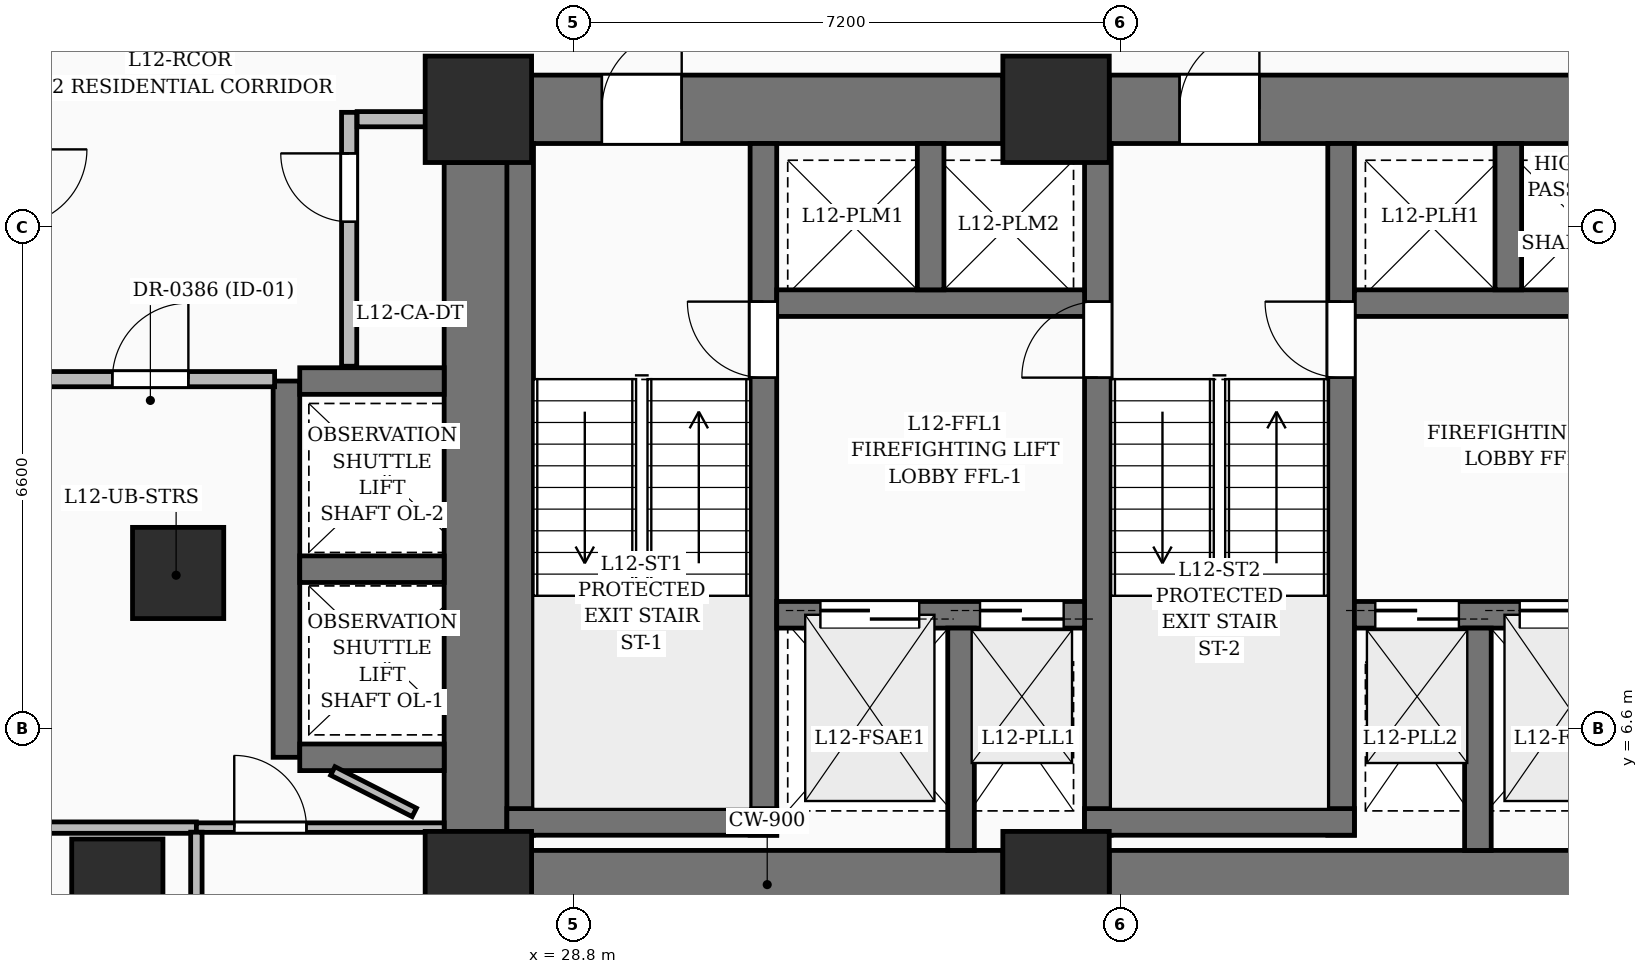
"""IFC4 building model, lengths in metres.
Left out: names, types, materials, properties, quantities, classifications, styles, units other than length and angle.
Written with IfcOpenShell. Run it as: python <this file> out.ifc"""

import sys

from ifc_helpers import new_model, si_unit, direction, frame, frame_2d, origin, origin_2d, place, context, subcontext, project, spatial, rectangle, extrude, element, fill, save


model = new_model("IFC4")
c1 = context("Model", 3, precision=1e-05, world=origin(), true_north=direction((0.0, 1.0)))
c2 = subcontext(c1, "Body", "Model", "MODEL_VIEW")
j1 = project(units=[si_unit("LENGTHUNIT", "METRE"), si_unit("PLANEANGLEUNIT", "RADIAN")], contexts=[c1])
p1 = place(None, origin())
s1 = spatial("IfcSite", under=j1, at=p1, CompositionType="ELEMENT")
p2 = place(p1, origin())
s2 = spatial("IfcBuilding", under=s1, at=p2, CompositionType="ELEMENT")
p3 = place(p2, frame((0.0, 0.0, 53.4)))
s3 = spatial("IfcBuildingStorey", under=s2, at=p3, CompositionType="ELEMENT", Elevation=53.4)
for number, where, z_axis, x_axis in (
    (1, (27.55, 4.55, 0.0), (0.0, 0.0, 1.0), (1.0, 0.0, 0.0)),
    (2, (35.15, 4.55, 0.0), (0.0, 0.0, 1.0), (1.0, 0.0, 0.0)),
    (3, (27.55, 14.75, 0.0), (0.0, 0.0, 1.0), (1.0, 0.0, 0.0)),
    (4, (35.15, 14.75, 0.0), (0.0, 0.0, 1.0), (1.0, 0.0, 0.0)),
):
    element("IfcColumn", number, at=place(p3, frame(where, z_axis=z_axis, x_axis=x_axis)), inside=s3, PredefinedType="COLUMN", context=c2, shape_type="SweptSolid", body=[
        extrude(rectangle(XDim=1.4, YDim=1.4, at=origin_2d()), origin(), (0.0, 0.0, 1.0), 3.6),
    ])
for number, where, z_axis, x_axis in (
    (5, (22.8, 4.55, 0.0), (0.0, 0.0, 1.0), (1.0, 0.0, 0.0)),
    (6, (23.6, 8.65, 0.0), (0.0, 0.0, 1.0), (1.0, 0.0, 0.0)),
):
    element("IfcColumn", number, at=place(p3, frame(where, z_axis=z_axis, x_axis=x_axis)), inside=s3, PredefinedType="COLUMN", context=c2, shape_type="SweptSolid", body=[
        extrude(rectangle(XDim=1.2, YDim=1.2, at=origin_2d()), origin(), (0.0, 0.0, 1.0), 3.6),
    ])
p4 = place(p3, frame((28.25, 4.55, 0.0), z_axis=(0.0, 0.0, 1.0), x_axis=(1.0, 0.0, 0.0)))
e7 = element("IfcWall", 7, at=p4, inside=s3, PredefinedType="SHEAR", context=c2, shape_type="SweptSolid", body=[
    extrude(rectangle(XDim=6.2, YDim=0.9, at=frame_2d((3.1, 0.0))), origin(), (0.0, 0.0, 1.0), 3.6),
])
p5 = place(p3, frame((35.85, 4.55, 0.0), z_axis=(0.0, 0.0, 1.0), x_axis=(1.0, 0.0, 0.0)))
e8 = element("IfcWall", 8, at=p5, inside=s3, PredefinedType="SHEAR", context=c2, shape_type="SweptSolid", body=[
    extrude(rectangle(XDim=10.5, YDim=0.9, at=frame_2d((5.25, 0.0))), origin(), (0.0, 0.0, 1.0), 3.6),
])
p6 = place(p3, frame((28.25, 14.75, 0.0), z_axis=(0.0, 0.0, 1.0), x_axis=(1.0, 0.0, 0.0)))
e9 = element("IfcWall", 9, at=p6, inside=s3, PredefinedType="SHEAR", context=c2, shape_type="SweptSolid", body=[
    extrude(rectangle(XDim=6.2, YDim=0.9, at=frame_2d((3.1, 0.0))), origin(), (0.0, 0.0, 1.0), 3.6),
])
p7 = place(p6, frame((0.925, 0.0, 0.0)))
e10 = element("IfcOpeningElement", 10, at=p7, cuts=e9, PredefinedType="OPENING", context=c2, shape_type="SweptSolid", body=[
    extrude(rectangle(XDim=1.05, YDim=2.15, at=frame_2d((0.525, 1.075))), frame((0.0, 0.46, 0.0), z_axis=(0.0, -1.0, 0.0), x_axis=(1.0, 0.0, 0.0)), (0.0, 0.0, 1.0), 0.92),
])
p8 = place(p3, frame((35.85, 14.75, 0.0), z_axis=(0.0, 0.0, 1.0), x_axis=(1.0, 0.0, 0.0)))
e11 = element("IfcWall", 11, at=p8, inside=s3, PredefinedType="SHEAR", context=c2, shape_type="SweptSolid", body=[
    extrude(rectangle(XDim=10.5, YDim=0.9, at=frame_2d((5.25, 0.0))), origin(), (0.0, 0.0, 1.0), 3.6),
])
p9 = place(p8, frame((0.925, 0.0, 0.0)))
e12 = element("IfcOpeningElement", 12, at=p9, cuts=e11, PredefinedType="OPENING", context=c2, shape_type="SweptSolid", body=[
    extrude(rectangle(XDim=1.05, YDim=2.15, at=frame_2d((0.525, 1.075))), frame((0.0, 0.46, 0.0), z_axis=(0.0, -1.0, 0.0), x_axis=(1.0, 0.0, 0.0)), (0.0, 0.0, 1.0), 0.92),
])
p10 = place(p8, frame((8.525, 0.0, 0.0)))
e13 = element("IfcOpeningElement", 13, at=p10, cuts=e11, PredefinedType="OPENING", context=c2, shape_type="SweptSolid", body=[
    extrude(rectangle(XDim=1.05, YDim=2.15, at=frame_2d((0.525, 1.075))), frame((0.0, 0.46, 0.0), z_axis=(0.0, -1.0, 0.0), x_axis=(1.0, 0.0, 0.0)), (0.0, 0.0, 1.0), 0.92),
])
p11 = place(p3, frame((27.55, 5.25, 0.0), z_axis=(0.0, 0.0, 1.0), x_axis=(0.0, 1.0, 0.0)))
e14 = element("IfcWall", 14, at=p11, inside=s3, PredefinedType="SHEAR", context=c2, shape_type="SweptSolid", body=[
    extrude(rectangle(XDim=8.8, YDim=0.9, at=frame_2d((4.4, 0.0))), origin(), (0.0, 0.0, 1.0), 3.6),
])
p12 = place(p3, frame((28.1, 5.2, 0.0), z_axis=(0.0, 0.0, 1.0), x_axis=(0.0, 1.0, 0.0)))
e15 = element("IfcWall", 15, at=p12, inside=s3, PredefinedType="SOLIDWALL", context=c2, shape_type="SweptSolid", body=[
    extrude(rectangle(XDim=9.1, YDim=0.35, at=frame_2d((4.55, 0.0))), origin(), (0.0, 0.0, 1.0), 3.6),
])
p13 = place(p3, frame((31.3, 5.2, 0.0), z_axis=(0.0, 0.0, 1.0), x_axis=(0.0, 1.0, 0.0)))
e16 = element("IfcWall", 16, at=p13, inside=s3, PredefinedType="SOLIDWALL", context=c2, shape_type="SweptSolid", body=[
    extrude(rectangle(XDim=9.1, YDim=0.35, at=frame_2d((4.55, 0.0))), origin(), (0.0, 0.0, 1.0), 3.6),
])
p14 = place(p13, frame((6.02, 0.0, 0.0)))
e17 = element("IfcOpeningElement", 17, at=p14, cuts=e16, PredefinedType="OPENING", context=c2, shape_type="SweptSolid", body=[
    extrude(rectangle(XDim=1.0, YDim=2.15, at=frame_2d((0.5, 1.075))), frame((0.0, 0.185, 0.0), z_axis=(0.0, -1.0, 0.0), x_axis=(1.0, 0.0, 0.0)), (0.0, 0.0, 1.0), 0.37),
])
p15 = place(p3, frame((27.925, 5.375, 0.0), z_axis=(0.0, 0.0, 1.0), x_axis=(1.0, 0.0, 0.0)))
e18 = element("IfcWall", 18, at=p15, inside=s3, PredefinedType="SOLIDWALL", context=c2, shape_type="SweptSolid", body=[
    extrude(rectangle(XDim=3.55, YDim=0.35, at=frame_2d((1.775, 0.0))), origin(), (0.0, 0.0, 1.0), 3.6),
])
p16 = place(p3, frame((35.7, 5.2, 0.0), z_axis=(0.0, 0.0, 1.0), x_axis=(0.0, 1.0, 0.0)))
e19 = element("IfcWall", 19, at=p16, inside=s3, PredefinedType="SOLIDWALL", context=c2, shape_type="SweptSolid", body=[
    extrude(rectangle(XDim=9.1, YDim=0.35, at=frame_2d((4.55, 0.0))), origin(), (0.0, 0.0, 1.0), 3.6),
])
p17 = place(p16, frame((6.02, 0.0, 0.0)))
e20 = element("IfcOpeningElement", 20, at=p17, cuts=e19, PredefinedType="OPENING", context=c2, shape_type="SweptSolid", body=[
    extrude(rectangle(XDim=1.0, YDim=2.15, at=frame_2d((0.5, 1.075))), frame((0.0, 0.185, 0.0), z_axis=(0.0, -1.0, 0.0), x_axis=(1.0, 0.0, 0.0)), (0.0, 0.0, 1.0), 0.37),
])
p18 = place(p3, frame((38.9, 5.2, 0.0), z_axis=(0.0, 0.0, 1.0), x_axis=(0.0, 1.0, 0.0)))
e21 = element("IfcWall", 21, at=p18, inside=s3, PredefinedType="SOLIDWALL", context=c2, shape_type="SweptSolid", body=[
    extrude(rectangle(XDim=9.1, YDim=0.35, at=frame_2d((4.55, 0.0))), origin(), (0.0, 0.0, 1.0), 3.6),
])
p19 = place(p18, frame((6.02, 0.0, 0.0)))
e22 = element("IfcOpeningElement", 22, at=p19, cuts=e21, PredefinedType="OPENING", context=c2, shape_type="SweptSolid", body=[
    extrude(rectangle(XDim=1.0, YDim=2.15, at=frame_2d((0.5, 1.075))), frame((0.0, 0.185, 0.0), z_axis=(0.0, -1.0, 0.0), x_axis=(1.0, 0.0, 0.0)), (0.0, 0.0, 1.0), 0.37),
])
p20 = place(p3, frame((35.525, 5.375, 0.0), z_axis=(0.0, 0.0, 1.0), x_axis=(1.0, 0.0, 0.0)))
e23 = element("IfcWall", 23, at=p20, inside=s3, PredefinedType="SOLIDWALL", context=c2, shape_type="SweptSolid", body=[
    extrude(rectangle(XDim=3.55, YDim=0.35, at=frame_2d((1.775, 0.0))), origin(), (0.0, 0.0, 1.0), 3.6),
])
p21 = place(p3, frame((31.475, 8.1, 0.0), z_axis=(0.0, 0.0, 1.0), x_axis=(1.0, 0.0, 0.0)))
e24 = element("IfcWall", 24, at=p21, inside=s3, PredefinedType="SOLIDWALL", context=c2, shape_type="SweptSolid", body=[
    extrude(rectangle(XDim=4.05, YDim=0.35, at=frame_2d((2.025, 0.0))), origin(), (0.0, 0.0, 1.0), 3.6),
])
p22 = place(p21, frame((0.575, 0.0, 0.0)))
e25 = element("IfcOpeningElement", 25, at=p22, cuts=e24, PredefinedType="OPENING", context=c2, shape_type="SweptSolid", body=[
    extrude(rectangle(XDim=1.3, YDim=2.25, at=frame_2d((0.65, 1.125))), frame((0.0, 0.185, 0.0), z_axis=(0.0, -1.0, 0.0), x_axis=(1.0, 0.0, 0.0)), (0.0, 0.0, 1.0), 0.37),
])
p23 = place(p21, frame((2.675, 0.0, 0.0)))
e26 = element("IfcOpeningElement", 26, at=p23, cuts=e24, PredefinedType="OPENING", context=c2, shape_type="SweptSolid", body=[
    extrude(rectangle(XDim=1.1, YDim=2.2, at=frame_2d((0.55, 1.1))), frame((0.0, 0.185, 0.0), z_axis=(0.0, -1.0, 0.0), x_axis=(1.0, 0.0, 0.0)), (0.0, 0.0, 1.0), 0.37),
])
p24 = place(p3, frame((39.075, 8.1, 0.0), z_axis=(0.0, 0.0, 1.0), x_axis=(1.0, 0.0, 0.0)))
e27 = element("IfcWall", 27, at=p24, inside=s3, PredefinedType="SOLIDWALL", context=c2, shape_type="SweptSolid", body=[
    extrude(rectangle(XDim=4.05, YDim=0.35, at=frame_2d((2.025, 0.0))), origin(), (0.0, 0.0, 1.0), 3.6),
])
p25 = place(p24, frame((2.175, 0.0, 0.0)))
e28 = element("IfcOpeningElement", 28, at=p25, cuts=e27, PredefinedType="OPENING", context=c2, shape_type="SweptSolid", body=[
    extrude(rectangle(XDim=1.3, YDim=2.25, at=frame_2d((0.65, 1.125))), frame((0.0, 0.185, 0.0), z_axis=(0.0, -1.0, 0.0), x_axis=(1.0, 0.0, 0.0)), (0.0, 0.0, 1.0), 0.37),
])
p26 = place(p24, frame((0.275, 0.0, 0.0)))
e29 = element("IfcOpeningElement", 29, at=p26, cuts=e27, PredefinedType="OPENING", context=c2, shape_type="SweptSolid", body=[
    extrude(rectangle(XDim=1.1, YDim=2.2, at=frame_2d((0.55, 1.1))), frame((0.0, 0.185, 0.0), z_axis=(0.0, -1.0, 0.0), x_axis=(1.0, 0.0, 0.0)), (0.0, 0.0, 1.0), 0.37),
])
for number, where, z_axis, x_axis in (
    (30, (33.9, 5.0, 0.0), (0.0, 0.0, 1.0), (0.0, 1.0, 0.0)),
    (31, (40.7, 5.0, 0.0), (0.0, 0.0, 1.0), (0.0, 1.0, 0.0)),
):
    element("IfcWall", number, at=place(p3, frame(where, z_axis=z_axis, x_axis=x_axis)), inside=s3, PredefinedType="SOLIDWALL", context=c2, shape_type="SweptSolid", body=[
        extrude(rectangle(XDim=2.925, YDim=0.35, at=frame_2d((1.462, 0.0))), origin(), (0.0, 0.0, 1.0), 3.6),
    ])
p27 = place(p3, frame((31.475, 12.2, 0.0), z_axis=(0.0, 0.0, 1.0), x_axis=(1.0, 0.0, 0.0)))
e32 = element("IfcWall", 32, at=p27, inside=s3, PredefinedType="SOLIDWALL", context=c2, shape_type="SweptSolid", body=[
    extrude(rectangle(XDim=4.05, YDim=0.35, at=frame_2d((2.025, 0.0))), origin(), (0.0, 0.0, 1.0), 3.6),
])
p28 = place(p3, frame((33.5, 12.375, 0.0), z_axis=(0.0, 0.0, 1.0), x_axis=(0.0, 1.0, 0.0)))
e33 = element("IfcWall", 33, at=p28, inside=s3, PredefinedType="SOLIDWALL", context=c2, shape_type="SweptSolid", body=[
    extrude(rectangle(XDim=1.925, YDim=0.35, at=frame_2d((0.962, 0.0))), origin(), (0.0, 0.0, 1.0), 3.6),
])
p29 = place(p3, frame((39.075, 12.2, 0.0), z_axis=(0.0, 0.0, 1.0), x_axis=(1.0, 0.0, 0.0)))
e34 = element("IfcWall", 34, at=p29, inside=s3, PredefinedType="SOLIDWALL", context=c2, shape_type="SweptSolid", body=[
    extrude(rectangle(XDim=4.05, YDim=0.35, at=frame_2d((2.025, 0.0))), origin(), (0.0, 0.0, 1.0), 3.6),
])
p30 = place(p3, frame((41.1, 12.375, 0.0), z_axis=(0.0, 0.0, 1.0), x_axis=(0.0, 1.0, 0.0)))
e35 = element("IfcWall", 35, at=p30, inside=s3, PredefinedType="SOLIDWALL", context=c2, shape_type="SweptSolid", body=[
    extrude(rectangle(XDim=1.925, YDim=0.35, at=frame_2d((0.962, 0.0))), origin(), (0.0, 0.0, 1.0), 3.6),
])
p31 = place(p3, frame((25.025, 6.225, 0.0), z_axis=(0.0, 0.0, 1.0), x_axis=(0.0, 1.0, 0.0)))
e36 = element("IfcWall", 36, at=p31, inside=s3, PredefinedType="SOLIDWALL", context=c2, shape_type="SweptSolid", body=[
    extrude(rectangle(XDim=4.95, YDim=0.35, at=frame_2d((2.475, 0.0))), origin(), (0.0, 0.0, 1.0), 3.6),
])
for number, where, z_axis, x_axis in (
    (37, (25.2, 6.225, 0.0), (0.0, 0.0, 1.0), (1.0, 0.0, 0.0)),
    (38, (25.2, 8.7, 0.0), (0.0, 0.0, 1.0), (1.0, 0.0, 0.0)),
    (39, (25.2, 11.175, 0.0), (0.0, 0.0, 1.0), (1.0, 0.0, 0.0)),
):
    element("IfcWall", number, at=place(p3, frame(where, z_axis=z_axis, x_axis=x_axis)), inside=s3, PredefinedType="SOLIDWALL", context=c2, shape_type="SweptSolid", body=[
        extrude(rectangle(XDim=1.9, YDim=0.35, at=frame_2d((0.95, 0.0))), origin(), (0.0, 0.0, 1.0), 3.6),
    ])
p32 = place(p3, frame((25.85, 11.37, 0.0), z_axis=(0.0, 0.0, 1.0), x_axis=(0.0, 1.0, 0.0)))
e40 = element("IfcWall", 40, at=p32, inside=s3, PredefinedType="PARTITIONING", context=c2, shape_type="SweptSolid", body=[
    extrude(rectangle(XDim=3.34, YDim=0.2, at=frame_2d((1.67, 0.0))), origin(), (0.0, 0.0, 1.0), 3.35),
])
p33 = place(p32, frame((1.9, 0.0, 0.0)))
e41 = element("IfcOpeningElement", 41, at=p33, cuts=e40, PredefinedType="OPENING", context=c2, shape_type="SweptSolid", body=[
    extrude(rectangle(XDim=0.9, YDim=2.1, at=frame_2d((0.45, 1.05))), frame((0.0, 0.11, 0.0), z_axis=(0.0, -1.0, 0.0), x_axis=(1.0, 0.0, 0.0)), (0.0, 0.0, 1.0), 0.22),
])
p34 = place(p3, frame((25.955, 14.62, 0.0), z_axis=(0.0, 0.0, 1.0), x_axis=(1.0, 0.0, 0.0)))
e42 = element("IfcWall", 42, at=p34, inside=s3, PredefinedType="PARTITIONING", context=c2, shape_type="SweptSolid", body=[
    extrude(rectangle(XDim=1.13, YDim=0.2, at=frame_2d((0.565, 0.0))), origin(), (0.0, 0.0, 1.0), 3.35),
])
p35 = place(p3, frame((21.485, 11.2, 0.0), z_axis=(0.0, 0.0, 1.0), x_axis=(1.0, 0.0, 0.0)))
e43 = element("IfcWall", 43, at=p35, inside=s3, PredefinedType="PARTITIONING", context=c2, shape_type="SweptSolid", body=[
    extrude(rectangle(XDim=3.384, YDim=0.2, at=frame_2d((1.692, 0.0))), origin(), (0.0, 0.0, 1.0), 3.01),
])
p36 = place(p35, frame((1.25, 0.0, 0.0)))
e44 = element("IfcOpeningElement", 44, at=p36, cuts=e43, PredefinedType="OPENING", context=c2, shape_type="SweptSolid", body=[
    extrude(rectangle(XDim=1.0, YDim=2.2, at=frame_2d((0.5, 1.1))), frame((0.0, 0.11, 0.0), z_axis=(0.0, -1.0, 0.0), x_axis=(1.0, 0.0, 0.0)), (0.0, 0.0, 1.0), 0.22),
])
p37 = place(p3, frame((18.145, 5.3, 0.0), z_axis=(0.0, 0.0, 1.0), x_axis=(1.0, 0.0, 0.0)))
e45 = element("IfcWall", 45, at=p37, inside=s3, PredefinedType="PARTITIONING", context=c2, shape_type="SweptSolid", body=[
    extrude(rectangle(XDim=5.695, YDim=0.15, at=frame_2d((2.848, 0.0))), origin(), (0.0, 0.0, 1.0), 3.01),
])
p38 = place(p37, frame((2.32, 0.0, 0.0)))
e46 = element("IfcOpeningElement", 46, at=p38, cuts=e45, PredefinedType="OPENING", context=c2, shape_type="SweptSolid", body=[
    extrude(rectangle(XDim=0.85, YDim=2.1, at=frame_2d((0.425, 1.05))), frame((0.0, 0.085, 0.0), z_axis=(0.0, -1.0, 0.0), x_axis=(1.0, 0.0, 0.0)), (0.0, 0.0, 1.0), 0.17),
])
p39 = place(p3, frame((23.84, 5.3, 0.0), z_axis=(0.0, 0.0, 1.0), x_axis=(1.0, 0.0, 0.0)))
e47 = element("IfcWall", 47, at=p39, inside=s3, PredefinedType="PARTITIONING", context=c2, shape_type="SweptSolid", body=[
    extrude(rectangle(XDim=3.26, YDim=0.125, at=frame_2d((1.63, 0.0))), origin(), (0.0, 0.0, 1.0), 3.35),
])
p40 = place(p39, frame((0.498, 0.0, 0.0)))
e48 = element("IfcOpeningElement", 48, at=p40, cuts=e47, PredefinedType="OPENING", context=c2, shape_type="SweptSolid", body=[
    extrude(rectangle(XDim=0.95, YDim=2.2, at=frame_2d((0.475, 1.1))), frame((0.0, 0.072, 0.0), z_axis=(0.0, -1.0, 0.0), x_axis=(1.0, 0.0, 0.0)), (0.0, 0.0, 1.0), 0.145),
])
p41 = place(p3, frame((23.84, 1.9, 0.0), z_axis=(0.0, 0.0, 1.0), x_axis=(0.0, 1.0, 0.0)))
e49 = element("IfcWall", 49, at=p41, inside=s3, PredefinedType="PARTITIONING", context=c2, shape_type="SweptSolid", body=[
    extrude(rectangle(XDim=3.34, YDim=0.15, at=frame_2d((1.67, 0.0))), origin(), (0.0, 0.0, 1.0), 2.309),
])
p42 = place(p3, frame((25.635, 6.046, 0.0), z_axis=(0.0, 0.0, 1.0), x_axis=(0.891197428161, -0.453615634694, 0.0)))
e50 = element("IfcWall", 50, at=p42, inside=s3, PredefinedType="PARTITIONING", context=c2, shape_type="SweptSolid", body=[
    extrude(rectangle(XDim=1.203, YDim=0.125, at=frame_2d((0.602, 0.0))), origin(), (0.0, 0.0, 1.0), 3.35),
])
p43 = place(p7, origin())
e51 = element("IfcDoor", 51, at=p43, inside=s3, OperationType="SINGLE_SWING_RIGHT", PredefinedType="DOOR", context=c2, shape_type="SweptSolid", body=[
    extrude(rectangle(XDim=1.05, YDim=2.15, at=frame_2d((0.525, 1.075))), frame((0.0, 0.025, 0.0), z_axis=(0.0, -1.0, 0.0), x_axis=(1.0, 0.0, 0.0)), (0.0, 0.0, 1.0), 0.05),
])
fill(e10, e51)
p44 = place(p9, origin())
e52 = element("IfcDoor", 52, at=p44, inside=s3, OperationType="SINGLE_SWING_RIGHT", PredefinedType="DOOR", context=c2, shape_type="SweptSolid", body=[
    extrude(rectangle(XDim=1.05, YDim=2.15, at=frame_2d((0.525, 1.075))), frame((0.0, 0.025, 0.0), z_axis=(0.0, -1.0, 0.0), x_axis=(1.0, 0.0, 0.0)), (0.0, 0.0, 1.0), 0.05),
])
fill(e12, e52)
p45 = place(p14, origin())
e53 = element("IfcDoor", 53, at=p45, inside=s3, OperationType="SINGLE_SWING_RIGHT", PredefinedType="DOOR", context=c2, shape_type="SweptSolid", body=[
    extrude(rectangle(XDim=1.0, YDim=2.15, at=frame_2d((0.5, 1.075))), frame((0.0, 0.025, 0.0), z_axis=(0.0, -1.0, 0.0), x_axis=(1.0, 0.0, 0.0)), (0.0, 0.0, 1.0), 0.05),
])
fill(e17, e53)
p46 = place(p17, origin())
e54 = element("IfcDoor", 54, at=p46, inside=s3, OperationType="SINGLE_SWING_LEFT", PredefinedType="DOOR", context=c2, shape_type="SweptSolid", body=[
    extrude(rectangle(XDim=1.0, YDim=2.15, at=frame_2d((0.5, 1.075))), frame((0.0, 0.025, 0.0), z_axis=(0.0, -1.0, 0.0), x_axis=(1.0, 0.0, 0.0)), (0.0, 0.0, 1.0), 0.05),
])
fill(e20, e54)
p47 = place(p19, origin())
e55 = element("IfcDoor", 55, at=p47, inside=s3, OperationType="SINGLE_SWING_RIGHT", PredefinedType="DOOR", context=c2, shape_type="SweptSolid", body=[
    extrude(rectangle(XDim=1.0, YDim=2.15, at=frame_2d((0.5, 1.075))), frame((0.0, 0.025, 0.0), z_axis=(0.0, -1.0, 0.0), x_axis=(1.0, 0.0, 0.0)), (0.0, 0.0, 1.0), 0.05),
])
fill(e22, e55)
p48 = place(p22, origin())
e56 = element("IfcDoor", 56, at=p48, inside=s3, OperationType="DOUBLE_DOOR_SLIDING", PredefinedType="DOOR", context=c2, shape_type="SweptSolid", body=[
    extrude(rectangle(XDim=1.3, YDim=2.25, at=frame_2d((0.65, 1.125))), frame((0.0, 0.025, 0.0), z_axis=(0.0, -1.0, 0.0), x_axis=(1.0, 0.0, 0.0)), (0.0, 0.0, 1.0), 0.05),
])
fill(e25, e56)
p49 = place(p25, origin())
e57 = element("IfcDoor", 57, at=p49, inside=s3, OperationType="DOUBLE_DOOR_SLIDING", PredefinedType="DOOR", context=c2, shape_type="SweptSolid", body=[
    extrude(rectangle(XDim=1.3, YDim=2.25, at=frame_2d((0.65, 1.125))), frame((0.0, 0.025, 0.0), z_axis=(0.0, -1.0, 0.0), x_axis=(1.0, 0.0, 0.0)), (0.0, 0.0, 1.0), 0.05),
])
fill(e28, e57)
p50 = place(p23, origin())
e58 = element("IfcDoor", 58, at=p50, inside=s3, OperationType="DOUBLE_DOOR_SLIDING", PredefinedType="DOOR", context=c2, shape_type="SweptSolid", body=[
    extrude(rectangle(XDim=1.1, YDim=2.2, at=frame_2d((0.55, 1.1))), frame((0.0, 0.025, 0.0), z_axis=(0.0, -1.0, 0.0), x_axis=(1.0, 0.0, 0.0)), (0.0, 0.0, 1.0), 0.05),
])
fill(e26, e58)
p51 = place(p26, origin())
e59 = element("IfcDoor", 59, at=p51, inside=s3, OperationType="DOUBLE_DOOR_SLIDING", PredefinedType="DOOR", context=c2, shape_type="SweptSolid", body=[
    extrude(rectangle(XDim=1.1, YDim=2.2, at=frame_2d((0.55, 1.1))), frame((0.0, 0.025, 0.0), z_axis=(0.0, -1.0, 0.0), x_axis=(1.0, 0.0, 0.0)), (0.0, 0.0, 1.0), 0.05),
])
fill(e29, e59)
p52 = place(p33, origin())
e60 = element("IfcDoor", 60, at=p52, inside=s3, OperationType="SINGLE_SWING_RIGHT", PredefinedType="DOOR", context=c2, shape_type="SweptSolid", body=[
    extrude(rectangle(XDim=0.9, YDim=2.1, at=frame_2d((0.45, 1.05))), frame((0.0, 0.025, 0.0), z_axis=(0.0, -1.0, 0.0), x_axis=(1.0, 0.0, 0.0)), (0.0, 0.0, 1.0), 0.05),
])
fill(e41, e60)
p53 = place(p36, origin())
e61 = element("IfcDoor", 61, at=p53, inside=s3, OperationType="SINGLE_SWING_RIGHT", PredefinedType="DOOR", context=c2, shape_type="SweptSolid", body=[
    extrude(rectangle(XDim=1.0, YDim=2.2, at=frame_2d((0.5, 1.1))), frame((0.0, 0.025, 0.0), z_axis=(0.0, -1.0, 0.0), x_axis=(1.0, 0.0, 0.0)), (0.0, 0.0, 1.0), 0.05),
])
fill(e44, e61)
p54 = place(p40, origin())
e62 = element("IfcDoor", 62, at=p54, inside=s3, OperationType="SINGLE_SWING_LEFT", PredefinedType="DOOR", context=c2, shape_type="SweptSolid", body=[
    extrude(rectangle(XDim=0.95, YDim=2.2, at=frame_2d((0.475, 1.1))), frame((0.0, 0.025, 0.0), z_axis=(0.0, -1.0, 0.0), x_axis=(1.0, 0.0, 0.0)), (0.0, 0.0, 1.0), 0.05),
])
fill(e48, e62)
save(model, sys.argv[1])
